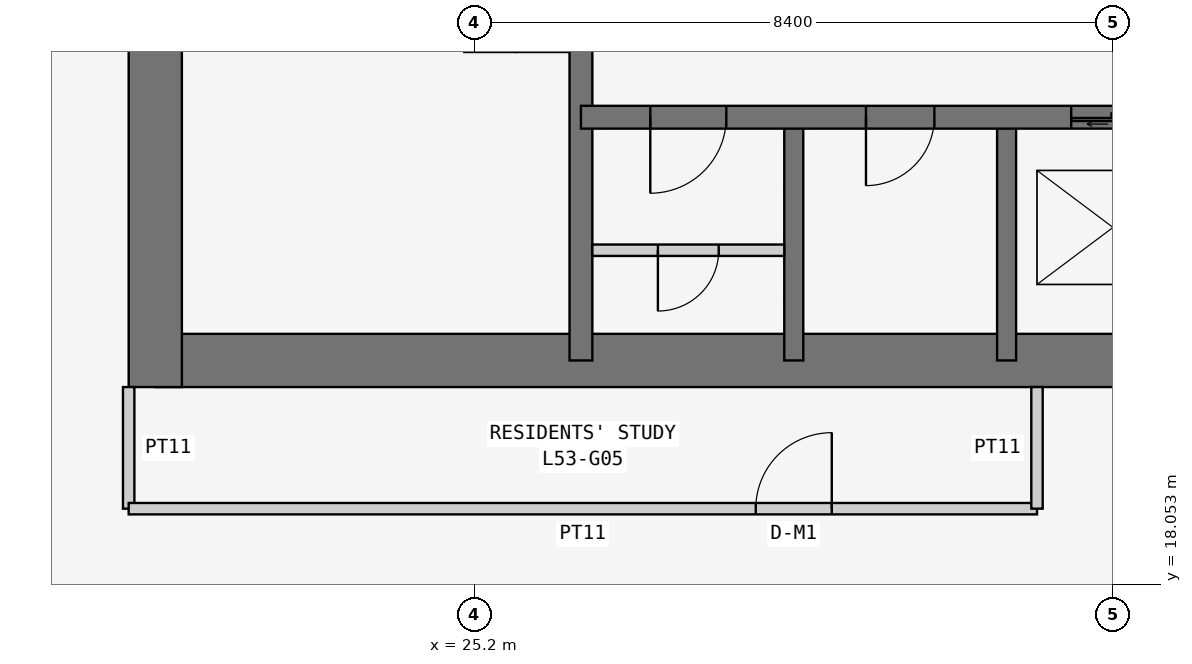
"""IFC4 building model, lengths in metres.
Left out: names, types, materials, properties, quantities, classifications, styles, units other than length and angle.
Written with IfcOpenShell. Run it as: python <this file> out.ifc"""

import sys

from ifc_helpers import new_model, si_unit, direction, frame, frame_2d, origin, place, context, subcontext, project, spatial, rectangle, extrude, element, fill, save


model = new_model("IFC4")
c1 = context("Model", 3, precision=1e-05, world=origin(), true_north=direction((0.0, 1.0)))
c2 = subcontext(c1, "Body", "Model", "MODEL_VIEW")
j1 = project(units=[si_unit("LENGTHUNIT", "METRE"), si_unit("PLANEANGLEUNIT", "RADIAN")], contexts=[c1])
p1 = place(None, origin())
s1 = spatial("IfcSite", under=j1, at=p1, CompositionType="ELEMENT")
p2 = place(p1, origin())
s2 = spatial("IfcBuilding", under=s1, at=p2, CompositionType="ELEMENT")
p3 = place(p2, frame((0.0, 0.0, 204.9)))
s3 = spatial("IfcBuildingStorey", under=s2, at=p3, CompositionType="ELEMENT", Elevation=204.9)
p4 = place(p3, frame((21.0, 21.0, 0.0), z_axis=(0.0, 0.0, 1.0), x_axis=(1.0, 0.0, 0.0)))
e1 = element("IfcWall", 1, at=p4, inside=s3, PredefinedType="SHEAR", context=c2, shape_type="SweptSolid", body=[
    extrude(rectangle(XDim=17.15, YDim=0.7, at=frame_2d((8.575, 0.0))), origin(), (0.0, 0.0, 1.0), 3.6),
])
p5 = place(p3, frame((21.0, 37.8, 0.0), z_axis=(0.0, 0.0, 1.0), x_axis=(0.0, -1.0, 0.0)))
e2 = element("IfcWall", 2, at=p5, inside=s3, PredefinedType="SHEAR", context=c2, shape_type="SweptSolid", body=[
    extrude(rectangle(XDim=17.15, YDim=0.7, at=frame_2d((8.575, 0.0))), origin(), (0.0, 0.0, 1.0), 3.6),
])
p6 = place(p5, frame((5.4, 0.0, 0.0)))
e3 = element("IfcOpeningElement", 3, at=p6, cuts=e2, PredefinedType="OPENING", context=c2, shape_type="SweptSolid", body=[
    extrude(rectangle(XDim=1.2, YDim=2.1, at=frame_2d((0.6, 1.05))), frame((0.0, 0.36, 0.0), z_axis=(0.0, -1.0, 0.0), x_axis=(1.0, 0.0, 0.0)), (0.0, 0.0, 1.0), 0.72),
])
p7 = place(p3, frame((26.6, 21.0, 0.0), z_axis=(0.0, 0.0, 1.0), x_axis=(0.0, 1.0, 0.0)))
e4 = element("IfcWall", 4, at=p7, inside=s3, PredefinedType="SHEAR", context=c2, shape_type="SweptSolid", body=[
    extrude(rectangle(XDim=16.8, YDim=0.3, at=frame_2d((8.4, 0.0))), origin(), (0.0, 0.0, 1.0), 3.6),
])
p8 = place(p7, frame((10.4, 0.0, 0.0)))
e5 = element("IfcOpeningElement", 5, at=p8, cuts=e4, PredefinedType="OPENING", context=c2, shape_type="SweptSolid", body=[
    extrude(rectangle(XDim=1.2, YDim=2.1, at=frame_2d((0.6, 1.05))), frame((0.0, 0.16, 0.0), z_axis=(0.0, -1.0, 0.0), x_axis=(1.0, 0.0, 0.0)), (0.0, 0.0, 1.0), 0.32),
])
p9 = place(p3, frame((26.6, 24.2, 0.0), z_axis=(0.0, 0.0, 1.0), x_axis=(1.0, 0.0, 0.0)))
e6 = element("IfcWall", 6, at=p9, inside=s3, PredefinedType="SHEAR", context=c2, shape_type="SweptSolid", body=[
    extrude(rectangle(XDim=11.2, YDim=0.3, at=frame_2d((5.6, 0.0))), origin(), (0.0, 0.0, 1.0), 3.6),
])
p10 = place(p9, frame((0.913, 0.0, 0.0)))
e7 = element("IfcOpeningElement", 7, at=p10, cuts=e6, PredefinedType="OPENING", context=c2, shape_type="SweptSolid", body=[
    extrude(rectangle(XDim=1.0, YDim=2.1, at=frame_2d((0.5, 1.05))), frame((0.0, 0.16, 0.0), z_axis=(0.0, -1.0, 0.0), x_axis=(1.0, 0.0, 0.0)), (0.0, 0.0, 1.0), 0.32),
])
p11 = place(p9, frame((3.75, 0.0, 0.0)))
e8 = element("IfcOpeningElement", 8, at=p11, cuts=e6, PredefinedType="OPENING", context=c2, shape_type="SweptSolid", body=[
    extrude(rectangle(XDim=0.9, YDim=2.1, at=frame_2d((0.45, 1.05))), frame((0.0, 0.16, 0.0), z_axis=(0.0, -1.0, 0.0), x_axis=(1.0, 0.0, 0.0)), (0.0, 0.0, 1.0), 0.32),
])
p12 = place(p9, frame((6.45, 0.0, 0.0)))
e9 = element("IfcOpeningElement", 9, at=p12, cuts=e6, PredefinedType="OPENING", context=c2, shape_type="SweptSolid", body=[
    extrude(rectangle(XDim=1.1, YDim=2.1, at=frame_2d((0.55, 1.05))), frame((0.0, 0.16, 0.0), z_axis=(0.0, -1.0, 0.0), x_axis=(1.0, 0.0, 0.0)), (0.0, 0.0, 1.0), 0.32),
])
p13 = place(p9, frame((9.1, 0.0, 0.0)))
e10 = element("IfcOpeningElement", 10, at=p13, cuts=e6, PredefinedType="OPENING", context=c2, shape_type="SweptSolid", body=[
    extrude(rectangle(XDim=1.1, YDim=2.1, at=frame_2d((0.55, 1.05))), frame((0.0, 0.16, 0.0), z_axis=(0.0, -1.0, 0.0), x_axis=(1.0, 0.0, 0.0)), (0.0, 0.0, 1.0), 0.32),
])
for number, where, z_axis, x_axis in (
    (11, (29.4, 21.0, 0.0), (0.0, 0.0, 1.0), (0.0, 1.0, 0.0)),
    (12, (32.2, 21.0, 0.0), (0.0, 0.0, 1.0), (0.0, 1.0, 0.0)),
):
    element("IfcWall", number, at=place(p3, frame(where, z_axis=z_axis, x_axis=x_axis)), inside=s3, PredefinedType="SHEAR", context=c2, shape_type="SweptSolid", body=[
        extrude(rectangle(XDim=3.2, YDim=0.25, at=frame_2d((1.6, 0.0))), origin(), (0.0, 0.0, 1.0), 3.6),
    ])
p14 = place(p3, frame((20.65, 20.65, 0.0), z_axis=(0.0, 0.0, 1.0), x_axis=(0.0, -1.0, 0.0)))
e13 = element("IfcWall", 13, at=p14, inside=s3, PredefinedType="PARTITIONING", context=c2, shape_type="SweptSolid", body=[
    extrude(rectangle(XDim=1.6, YDim=0.15, at=frame_2d((0.8, 0.0))), origin(), (0.0, 0.0, 1.0), 3.45),
])
p15 = place(p3, frame((20.65, 19.05, 0.0), z_axis=(0.0, 0.0, 1.0), x_axis=(1.0, 0.0, 0.0)))
e14 = element("IfcWall", 14, at=p15, inside=s3, PredefinedType="PARTITIONING", context=c2, shape_type="SweptSolid", body=[
    extrude(rectangle(XDim=11.95, YDim=0.15, at=frame_2d((5.975, 0.0))), origin(), (0.0, 0.0, 1.0), 3.45),
])
p16 = place(p15, frame((8.25, 0.0, 0.0)))
e15 = element("IfcOpeningElement", 15, at=p16, cuts=e14, PredefinedType="OPENING", context=c2, shape_type="SweptSolid", body=[
    extrude(rectangle(XDim=1.0, YDim=2.1, at=frame_2d((0.5, 1.05))), frame((0.0, 0.085, 0.0), z_axis=(0.0, -1.0, 0.0), x_axis=(1.0, 0.0, 0.0)), (0.0, 0.0, 1.0), 0.17),
])
p17 = place(p3, frame((32.6, 19.05, 0.0), z_axis=(0.0, 0.0, 1.0), x_axis=(0.0, 1.0, 0.0)))
e16 = element("IfcWall", 16, at=p17, inside=s3, PredefinedType="PARTITIONING", context=c2, shape_type="SweptSolid", body=[
    extrude(rectangle(XDim=1.6, YDim=0.15, at=frame_2d((0.8, 0.0))), origin(), (0.0, 0.0, 1.0), 3.45),
])
p18 = place(p3, frame((26.75, 22.45, 0.0), z_axis=(0.0, 0.0, 1.0), x_axis=(1.0, 0.0, 0.0)))
e17 = element("IfcWall", 17, at=p18, inside=s3, PredefinedType="PARTITIONING", context=c2, shape_type="SweptSolid", body=[
    extrude(rectangle(XDim=2.525, YDim=0.15, at=frame_2d((1.262, 0.0))), origin(), (0.0, 0.0, 1.0), 3.45),
])
p19 = place(p18, frame((0.863, 0.0, 0.0)))
e18 = element("IfcOpeningElement", 18, at=p19, cuts=e17, PredefinedType="OPENING", context=c2, shape_type="SweptSolid", body=[
    extrude(rectangle(XDim=0.8, YDim=2.1, at=frame_2d((0.4, 1.05))), frame((0.0, 0.085, 0.0), z_axis=(0.0, -1.0, 0.0), x_axis=(1.0, 0.0, 0.0)), (0.0, 0.0, 1.0), 0.17),
])
p20 = place(p16, origin())
e19 = element("IfcDoor", 19, at=p20, inside=s3, OperationType="SINGLE_SWING_RIGHT", PredefinedType="DOOR", context=c2, shape_type="SweptSolid", body=[
    extrude(rectangle(XDim=1.0, YDim=2.1, at=frame_2d((0.5, 1.05))), frame((0.0, 0.025, 0.0), z_axis=(0.0, -1.0, 0.0), x_axis=(1.0, 0.0, 0.0)), (0.0, 0.0, 1.0), 0.05),
])
fill(e15, e19)
p21 = place(p10, frame((1.0, 0.0, 0.0), z_axis=(0.0, 0.0, 1.0), x_axis=(-1.0, 0.0, 0.0)))
e20 = element("IfcDoor", 20, at=p21, inside=s3, OperationType="SINGLE_SWING_RIGHT", PredefinedType="DOOR", context=c2, shape_type="SweptSolid", body=[
    extrude(rectangle(XDim=1.0, YDim=2.1, at=frame_2d((0.5, 1.05))), frame((0.0, 0.025, 0.0), z_axis=(0.0, -1.0, 0.0), x_axis=(1.0, 0.0, 0.0)), (0.0, 0.0, 1.0), 0.05),
])
fill(e7, e20)
p22 = place(p19, frame((0.8, 0.0, 0.0), z_axis=(0.0, 0.0, 1.0), x_axis=(-1.0, 0.0, 0.0)))
e21 = element("IfcDoor", 21, at=p22, inside=s3, OperationType="SINGLE_SWING_RIGHT", PredefinedType="DOOR", context=c2, shape_type="SweptSolid", body=[
    extrude(rectangle(XDim=0.8, YDim=2.1, at=frame_2d((0.4, 1.05))), frame((0.0, 0.025, 0.0), z_axis=(0.0, -1.0, 0.0), x_axis=(1.0, 0.0, 0.0)), (0.0, 0.0, 1.0), 0.05),
])
fill(e18, e21)
p23 = place(p11, frame((0.9, 0.0, 0.0), z_axis=(0.0, 0.0, 1.0), x_axis=(-1.0, 0.0, 0.0)))
e22 = element("IfcDoor", 22, at=p23, inside=s3, OperationType="SINGLE_SWING_RIGHT", PredefinedType="DOOR", context=c2, shape_type="SweptSolid", body=[
    extrude(rectangle(XDim=0.9, YDim=2.1, at=frame_2d((0.45, 1.05))), frame((0.0, 0.025, 0.0), z_axis=(0.0, -1.0, 0.0), x_axis=(1.0, 0.0, 0.0)), (0.0, 0.0, 1.0), 0.05),
])
fill(e8, e22)
p24 = place(p12, origin())
e23 = element("IfcDoor", 23, at=p24, inside=s3, OperationType="DOUBLE_DOOR_SLIDING", PredefinedType="DOOR", context=c2, shape_type="SweptSolid", body=[
    extrude(rectangle(XDim=1.1, YDim=2.1, at=frame_2d((0.55, 1.05))), frame((0.0, 0.025, 0.0), z_axis=(0.0, -1.0, 0.0), x_axis=(1.0, 0.0, 0.0)), (0.0, 0.0, 1.0), 0.05),
])
fill(e9, e23)
save(model, sys.argv[1])
